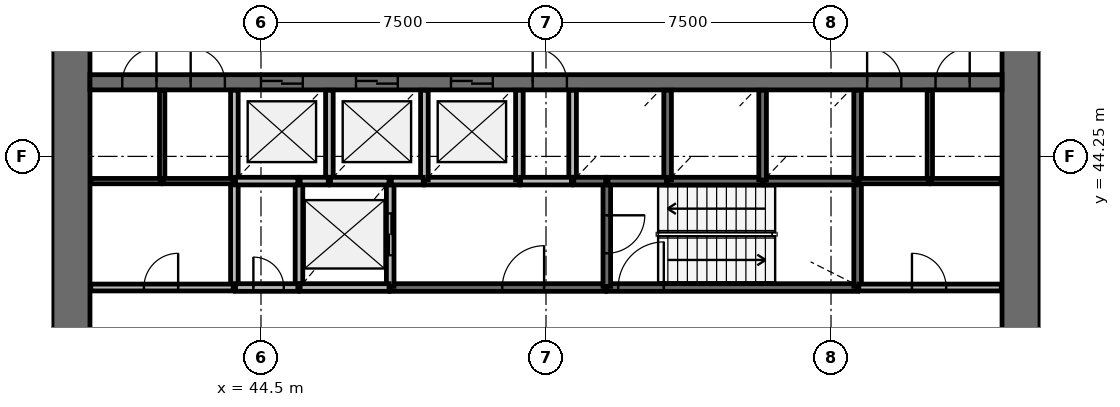
"""IFC4 building model, lengths in metres.
Left out: names, types, materials, properties, quantities, classifications, styles, units other than length and angle.
Written with IfcOpenShell. Run it as: python <this file> out.ifc"""

import sys

from ifc_helpers import new_model, si_unit, direction, frame, frame_2d, origin, place, context, subcontext, project, spatial, rectangle, extrude, source, transform, mapped, element, fill, save


model = new_model("IFC4")
c1 = context("Model", 3, precision=1e-05, world=origin(), true_north=direction((0.0, 1.0)))
c2 = subcontext(c1, "Body", "Model", "MODEL_VIEW")
j1 = project(units=[si_unit("LENGTHUNIT", "METRE"), si_unit("PLANEANGLEUNIT", "RADIAN")], contexts=[c1])
p1 = place(None, origin())
s1 = spatial("IfcSite", under=j1, at=p1, CompositionType="ELEMENT")
p2 = place(p1, origin())
s2 = spatial("IfcBuilding", under=s1, at=p2, CompositionType="ELEMENT")
p3 = place(p2, frame((0.0, 0.0, 31.4)))
s3 = spatial("IfcBuildingStorey", under=s2, at=p3, CompositionType="ELEMENT", Elevation=31.4)
p4 = place(p3, frame((64.5, 38.0, 0.0), z_axis=(0.0, 0.0, 1.0), x_axis=(0.0, 1.0, 0.0)))
e1 = element("IfcWall", 1, at=p4, inside=s3, PredefinedType="SHEAR", context=c2, shape_type="SweptSolid", body=[
    extrude(rectangle(XDim=20.0, YDim=1.0, at=frame_2d((10.0, 0.0))), origin(), (0.0, 0.0, 1.0), 4.4),
])
p5 = place(p4, frame((9.1, 0.0, 0.0)))
e2 = element("IfcOpeningElement", 2, at=p5, cuts=e1, PredefinedType="OPENING", context=c2, shape_type="SweptSolid", body=[
    extrude(rectangle(XDim=1.8, YDim=2.1, at=frame_2d((0.9, 1.05))), frame((0.0, 0.51, 0.0), z_axis=(0.0, -1.0, 0.0), x_axis=(1.0, 0.0, 0.0)), (0.0, 0.0, 1.0), 1.02),
])
p6 = place(p3, frame((39.5, 58.0, 0.0), z_axis=(0.0, 0.0, 1.0), x_axis=(0.0, -1.0, 0.0)))
e3 = element("IfcWall", 3, at=p6, inside=s3, PredefinedType="SHEAR", context=c2, shape_type="SweptSolid", body=[
    extrude(rectangle(XDim=20.0, YDim=1.0, at=frame_2d((10.0, 0.0))), origin(), (0.0, 0.0, 1.0), 4.4),
])
p7 = place(p6, frame((9.1, 0.0, 0.0)))
e4 = element("IfcOpeningElement", 4, at=p7, cuts=e3, PredefinedType="OPENING", context=c2, shape_type="SweptSolid", body=[
    extrude(rectangle(XDim=1.8, YDim=2.1, at=frame_2d((0.9, 1.05))), frame((0.0, 0.51, 0.0), z_axis=(0.0, -1.0, 0.0), x_axis=(1.0, 0.0, 0.0)), (0.0, 0.0, 1.0), 1.02),
])
p8 = place(p3, frame((40.0, 46.2, 0.0), z_axis=(0.0, 0.0, 1.0), x_axis=(1.0, 0.0, 0.0)))
e5 = element("IfcWall", 5, at=p8, inside=s3, PredefinedType="SHEAR", context=c2, shape_type="SweptSolid", body=[
    extrude(rectangle(XDim=24.0, YDim=0.4, at=frame_2d((12.0, 0.0))), origin(), (0.0, 0.0, 1.0), 4.4),
])
p9 = place(p8, frame((4.5, 0.0, 0.0)))
e6 = element("IfcOpeningElement", 6, at=p9, cuts=e5, PredefinedType="OPENING", context=c2, shape_type="SweptSolid", body=[
    extrude(rectangle(XDim=1.1, YDim=2.1, at=frame_2d((0.55, 1.05))), frame((0.0, 0.21, 0.0), z_axis=(0.0, -1.0, 0.0), x_axis=(1.0, 0.0, 0.0)), (0.0, 0.0, 1.0), 0.42),
])
p10 = place(p8, frame((7.0, 0.0, 0.0)))
e7 = element("IfcOpeningElement", 7, at=p10, cuts=e5, PredefinedType="OPENING", context=c2, shape_type="SweptSolid", body=[
    extrude(rectangle(XDim=1.1, YDim=2.1, at=frame_2d((0.55, 1.05))), frame((0.0, 0.21, 0.0), z_axis=(0.0, -1.0, 0.0), x_axis=(1.0, 0.0, 0.0)), (0.0, 0.0, 1.0), 0.42),
])
p11 = place(p8, frame((9.5, 0.0, 0.0)))
e8 = element("IfcOpeningElement", 8, at=p11, cuts=e5, PredefinedType="OPENING", context=c2, shape_type="SweptSolid", body=[
    extrude(rectangle(XDim=1.1, YDim=2.1, at=frame_2d((0.55, 1.05))), frame((0.0, 0.21, 0.0), z_axis=(0.0, -1.0, 0.0), x_axis=(1.0, 0.0, 0.0)), (0.0, 0.0, 1.0), 0.42),
])
p12 = place(p8, frame((20.45, 0.0, 0.0)))
e9 = element("IfcOpeningElement", 9, at=p12, cuts=e5, PredefinedType="OPENING", context=c2, shape_type="SweptSolid", body=[
    extrude(rectangle(XDim=0.9, YDim=2.1, at=frame_2d((0.45, 1.05))), frame((0.0, 0.21, 0.0), z_axis=(0.0, -1.0, 0.0), x_axis=(1.0, 0.0, 0.0)), (0.0, 0.0, 1.0), 0.42),
])
p13 = place(p8, frame((22.25, 0.0, 0.0)))
e10 = element("IfcOpeningElement", 10, at=p13, cuts=e5, PredefinedType="OPENING", context=c2, shape_type="SweptSolid", body=[
    extrude(rectangle(XDim=0.9, YDim=2.1, at=frame_2d((0.45, 1.05))), frame((0.0, 0.21, 0.0), z_axis=(0.0, -1.0, 0.0), x_axis=(1.0, 0.0, 0.0)), (0.0, 0.0, 1.0), 0.42),
])
p14 = place(p8, frame((0.85, 0.0, 0.0)))
e11 = element("IfcOpeningElement", 11, at=p14, cuts=e5, PredefinedType="OPENING", context=c2, shape_type="SweptSolid", body=[
    extrude(rectangle(XDim=0.9, YDim=2.1, at=frame_2d((0.45, 1.05))), frame((0.0, 0.21, 0.0), z_axis=(0.0, -1.0, 0.0), x_axis=(1.0, 0.0, 0.0)), (0.0, 0.0, 1.0), 0.42),
])
p15 = place(p8, frame((2.65, 0.0, 0.0)))
e12 = element("IfcOpeningElement", 12, at=p15, cuts=e5, PredefinedType="OPENING", context=c2, shape_type="SweptSolid", body=[
    extrude(rectangle(XDim=0.9, YDim=2.1, at=frame_2d((0.45, 1.05))), frame((0.0, 0.21, 0.0), z_axis=(0.0, -1.0, 0.0), x_axis=(1.0, 0.0, 0.0)), (0.0, 0.0, 1.0), 0.42),
])
p16 = place(p8, frame((11.65, 0.0, 0.0)))
e13 = element("IfcOpeningElement", 13, at=p16, cuts=e5, PredefinedType="OPENING", context=c2, shape_type="SweptSolid", body=[
    extrude(rectangle(XDim=0.9, YDim=2.1, at=frame_2d((0.45, 1.05))), frame((0.0, 0.21, 0.0), z_axis=(0.0, -1.0, 0.0), x_axis=(1.0, 0.0, 0.0)), (0.0, 0.0, 1.0), 0.42),
])
p17 = place(p3, frame((53.6, 40.8, 0.0), z_axis=(0.0, 0.0, 1.0), x_axis=(1.0, 0.0, 0.0)))
e14 = element("IfcWall", 14, at=p17, inside=s3, PredefinedType="SOLIDWALL", context=c2, shape_type="SweptSolid", body=[
    extrude(rectangle(XDim=6.6, YDim=0.2, at=frame_2d((3.3, 0.0))), origin(), (0.0, 0.0, 1.0), 3.95),
])
p18 = place(p17, frame((0.3, 0.0, 0.0)))
e15 = element("IfcOpeningElement", 15, at=p18, cuts=e14, PredefinedType="OPENING", context=c2, shape_type="SweptSolid", body=[
    extrude(rectangle(XDim=1.2, YDim=2.1, at=frame_2d((0.6, 1.05))), frame((0.0, 0.11, 0.0), z_axis=(0.0, -1.0, 0.0), x_axis=(1.0, 0.0, 0.0)), (0.0, 0.0, 1.0), 0.22),
])
p19 = place(p3, frame((47.9, 40.8, 0.0), z_axis=(0.0, 0.0, 1.0), x_axis=(1.0, 0.0, 0.0)))
e16 = element("IfcWall", 16, at=p19, inside=s3, PredefinedType="SOLIDWALL", context=c2, shape_type="SweptSolid", body=[
    extrude(rectangle(XDim=5.67, YDim=0.2, at=frame_2d((2.835, 0.0))), origin(), (0.0, 0.0, 1.0), 3.95),
])
p20 = place(p19, frame((2.95, 0.0, 0.0)))
e17 = element("IfcOpeningElement", 17, at=p20, cuts=e16, PredefinedType="OPENING", context=c2, shape_type="SweptSolid", body=[
    extrude(rectangle(XDim=1.1, YDim=2.1, at=frame_2d((0.55, 1.05))), frame((0.0, 0.11, 0.0), z_axis=(0.0, -1.0, 0.0), x_axis=(1.0, 0.0, 0.0)), (0.0, 0.0, 1.0), 0.22),
])
for number, where, z_axis, x_axis in (
    (18, (43.8, 43.6, 0.0), (0.0, 0.0, 1.0), (0.0, -1.0, 0.0)),
    (19, (45.5, 43.6, 0.0), (0.0, 0.0, 1.0), (0.0, -1.0, 0.0)),
):
    element("IfcWall", number, at=place(p3, frame(where, z_axis=z_axis, x_axis=x_axis)), inside=s3, PredefinedType="SOLIDWALL", context=c2, shape_type="SweptSolid", body=[
        extrude(rectangle(XDim=2.8, YDim=0.2, at=frame_2d((1.4, 0.0))), origin(), (0.0, 0.0, 1.0), 3.95),
    ])
p21 = place(p3, frame((47.9, 40.83, 0.0), z_axis=(0.0, 0.0, 1.0), x_axis=(0.0, 1.0, 0.0)))
e20 = element("IfcWall", 20, at=p21, inside=s3, PredefinedType="SOLIDWALL", context=c2, shape_type="SweptSolid", body=[
    extrude(rectangle(XDim=2.77, YDim=0.2, at=frame_2d((1.385, 0.0))), origin(), (0.0, 0.0, 1.0), 3.95),
])
p22 = place(p21, frame((0.82, 0.0, 0.0)))
e21 = element("IfcOpeningElement", 21, at=p22, cuts=e20, PredefinedType="OPENING", context=c2, shape_type="SweptSolid", body=[
    extrude(rectangle(XDim=1.1, YDim=2.1, at=frame_2d((0.55, 1.05))), frame((0.0, 0.11, 0.0), z_axis=(0.0, -1.0, 0.0), x_axis=(1.0, 0.0, 0.0)), (0.0, 0.0, 1.0), 0.22),
])
p23 = place(p3, frame((60.2, 40.83, 0.0), z_axis=(0.0, 0.0, 1.0), x_axis=(0.0, 1.0, 0.0)))
e22 = element("IfcWall", 22, at=p23, inside=s3, PredefinedType="SOLIDWALL", context=c2, shape_type="SweptSolid", body=[
    extrude(rectangle(XDim=2.77, YDim=0.2, at=frame_2d((1.385, 0.0))), origin(), (0.0, 0.0, 1.0), 3.95),
])
p24 = place(p3, frame((53.6, 43.6, 0.0), z_axis=(0.0, 0.0, 1.0), x_axis=(0.0, -1.0, 0.0)))
e23 = element("IfcWall", 23, at=p24, inside=s3, PredefinedType="SOLIDWALL", context=c2, shape_type="SweptSolid", body=[
    extrude(rectangle(XDim=2.77, YDim=0.2, at=frame_2d((1.385, 0.0))), origin(), (0.0, 0.0, 1.0), 3.95),
])
p25 = place(p24, frame((0.9, 0.0, 0.0)))
e24 = element("IfcOpeningElement", 24, at=p25, cuts=e23, PredefinedType="OPENING", context=c2, shape_type="SweptSolid", body=[
    extrude(rectangle(XDim=1.0, YDim=2.1, at=frame_2d((0.5, 1.05))), frame((0.0, 0.11, 0.0), z_axis=(0.0, -1.0, 0.0), x_axis=(1.0, 0.0, 0.0)), (0.0, 0.0, 1.0), 0.22),
])
for number, where, z_axis, x_axis in (
    (25, (48.8, 43.6, 0.0), (0.0, 0.0, 1.0), (1.0, 0.0, 0.0)),
    (26, (55.2, 43.6, 0.0), (0.0, 0.0, 1.0), (1.0, 0.0, 0.0)),
):
    element("IfcWall", number, at=place(p3, frame(where, z_axis=z_axis, x_axis=x_axis)), inside=s3, PredefinedType="SOLIDWALL", context=c2, shape_type="SweptSolid", body=[
        extrude(rectangle(XDim=2.5, YDim=0.2, at=frame_2d((1.25, 0.0))), origin(), (0.0, 0.0, 1.0), 3.95),
    ])
p26 = place(p3, frame((57.73, 43.6, 0.0), z_axis=(0.0, 0.0, 1.0), x_axis=(1.0, 0.0, 0.0)))
e27 = element("IfcWall", 27, at=p26, inside=s3, PredefinedType="SOLIDWALL", context=c2, shape_type="SweptSolid", body=[
    extrude(rectangle(XDim=2.44, YDim=0.2, at=frame_2d((1.22, 0.0))), origin(), (0.0, 0.0, 1.0), 3.95),
])
p27 = place(p3, frame((45.53, 40.8, 0.0), z_axis=(0.0, 0.0, 1.0), x_axis=(1.0, 0.0, 0.0)))
e28 = element("IfcWall", 28, at=p27, inside=s3, PredefinedType="SOLIDWALL", context=c2, shape_type="SweptSolid", body=[
    extrude(rectangle(XDim=2.34, YDim=0.2, at=frame_2d((1.17, 0.0))), origin(), (0.0, 0.0, 1.0), 3.95),
])
p28 = place(p3, frame((43.8, 45.99, 0.0), z_axis=(0.0, 0.0, 1.0), x_axis=(0.0, -1.0, 0.0)))
e29 = element("IfcWall", 29, at=p28, inside=s3, PredefinedType="SOLIDWALL", context=c2, shape_type="SweptSolid", body=[
    extrude(rectangle(XDim=2.36, YDim=0.2, at=frame_2d((1.18, 0.0))), origin(), (0.0, 0.0, 1.0), 3.95),
])
p29 = place(p3, frame((46.3, 43.6, 0.0), z_axis=(0.0, 0.0, 1.0), x_axis=(0.0, 1.0, 0.0)))
e30 = element("IfcWall", 30, at=p29, inside=s3, PredefinedType="SOLIDWALL", context=c2, shape_type="SweptSolid", body=[
    extrude(rectangle(XDim=2.39, YDim=0.2, at=frame_2d((1.195, 0.0))), origin(), (0.0, 0.0, 1.0), 3.95),
])
for number, where, z_axis, x_axis in (
    (31, (48.8, 43.63, 0.0), (0.0, 0.0, 1.0), (0.0, 1.0, 0.0)),
    (32, (51.3, 43.63, 0.0), (0.0, 0.0, 1.0), (0.0, 1.0, 0.0)),
):
    element("IfcWall", number, at=place(p3, frame(where, z_axis=z_axis, x_axis=x_axis)), inside=s3, PredefinedType="SOLIDWALL", context=c2, shape_type="SweptSolid", body=[
        extrude(rectangle(XDim=2.36, YDim=0.2, at=frame_2d((1.18, 0.0))), origin(), (0.0, 0.0, 1.0), 3.95),
    ])
p30 = place(p3, frame((52.7, 45.99, 0.0), z_axis=(0.0, 0.0, 1.0), x_axis=(0.0, -1.0, 0.0)))
e33 = element("IfcWall", 33, at=p30, inside=s3, PredefinedType="SOLIDWALL", context=c2, shape_type="SweptSolid", body=[
    extrude(rectangle(XDim=2.39, YDim=0.2, at=frame_2d((1.195, 0.0))), origin(), (0.0, 0.0, 1.0), 3.95),
])
for number, where, z_axis, x_axis in (
    (34, (55.2, 43.63, 0.0), (0.0, 0.0, 1.0), (0.0, 1.0, 0.0)),
    (35, (57.7, 43.63, 0.0), (0.0, 0.0, 1.0), (0.0, 1.0, 0.0)),
    (36, (60.2, 43.63, 0.0), (0.0, 0.0, 1.0), (0.0, 1.0, 0.0)),
):
    element("IfcWall", number, at=place(p3, frame(where, z_axis=z_axis, x_axis=x_axis)), inside=s3, PredefinedType="SOLIDWALL", context=c2, shape_type="SweptSolid", body=[
        extrude(rectangle(XDim=2.36, YDim=0.2, at=frame_2d((1.18, 0.0))), origin(), (0.0, 0.0, 1.0), 3.95),
    ])
p31 = place(p3, frame((43.83, 43.6, 0.0), z_axis=(0.0, 0.0, 1.0), x_axis=(1.0, 0.0, 0.0)))
e37 = element("IfcWall", 37, at=p31, inside=s3, PredefinedType="SOLIDWALL", context=c2, shape_type="SweptSolid", body=[
    extrude(rectangle(XDim=1.64, YDim=0.2, at=frame_2d((0.82, 0.0))), origin(), (0.0, 0.0, 1.0), 3.95),
])
p32 = place(p3, frame((43.83, 40.8, 0.0), z_axis=(0.0, 0.0, 1.0), x_axis=(1.0, 0.0, 0.0)))
e38 = element("IfcWall", 38, at=p32, inside=s3, PredefinedType="SOLIDWALL", context=c2, shape_type="SweptSolid", body=[
    extrude(rectangle(XDim=1.64, YDim=0.2, at=frame_2d((0.82, 0.0))), origin(), (0.0, 0.0, 1.0), 3.95),
])
p33 = place(p32, frame((0.47, 0.0, 0.0)))
e39 = element("IfcOpeningElement", 39, at=p33, cuts=e38, PredefinedType="OPENING", context=c2, shape_type="SweptSolid", body=[
    extrude(rectangle(XDim=0.8, YDim=2.1, at=frame_2d((0.4, 1.05))), frame((0.0, 0.11, 0.0), z_axis=(0.0, -1.0, 0.0), x_axis=(1.0, 0.0, 0.0)), (0.0, 0.0, 1.0), 0.22),
])
for number, where, z_axis, x_axis in (
    (40, (46.33, 43.6, 0.0), (0.0, 0.0, 1.0), (1.0, 0.0, 0.0)),
    (41, (53.63, 43.6, 0.0), (0.0, 0.0, 1.0), (1.0, 0.0, 0.0)),
):
    element("IfcWall", number, at=place(p3, frame(where, z_axis=z_axis, x_axis=x_axis)), inside=s3, PredefinedType="SOLIDWALL", context=c2, shape_type="SweptSolid", body=[
        extrude(rectangle(XDim=1.54, YDim=0.2, at=frame_2d((0.77, 0.0))), origin(), (0.0, 0.0, 1.0), 3.95),
    ])
p34 = place(p3, frame((52.67, 43.6, 0.0), z_axis=(0.0, 0.0, 1.0), x_axis=(-1.0, 0.0, 0.0)))
e42 = element("IfcWall", 42, at=p34, inside=s3, PredefinedType="SOLIDWALL", context=c2, shape_type="SweptSolid", body=[
    extrude(rectangle(XDim=1.34, YDim=0.2, at=frame_2d((0.67, 0.0))), origin(), (0.0, 0.0, 1.0), 3.95),
])
for number, where, z_axis, x_axis in (
    (43, (47.93, 43.6, 0.0), (0.0, 0.0, 1.0), (1.0, 0.0, 0.0)),
    (44, (52.73, 43.6, 0.0), (0.0, 0.0, 1.0), (1.0, 0.0, 0.0)),
):
    element("IfcWall", number, at=place(p3, frame(where, z_axis=z_axis, x_axis=x_axis)), inside=s3, PredefinedType="SOLIDWALL", context=c2, shape_type="SweptSolid", body=[
        extrude(rectangle(XDim=0.84, YDim=0.2, at=frame_2d((0.42, 0.0))), origin(), (0.0, 0.0, 1.0), 3.95),
    ])
p35 = place(p3, frame((45.53, 43.6, 0.0), z_axis=(0.0, 0.0, 1.0), x_axis=(1.0, 0.0, 0.0)))
e45 = element("IfcWall", 45, at=p35, inside=s3, PredefinedType="SOLIDWALL", context=c2, shape_type="SweptSolid", body=[
    extrude(rectangle(XDim=0.74, YDim=0.2, at=frame_2d((0.37, 0.0))), origin(), (0.0, 0.0, 1.0), 3.95),
])
p36 = place(p3, frame((40.02, 40.8, 0.0), z_axis=(0.0, 0.0, 1.0), x_axis=(1.0, 0.0, 0.0)))
e46 = element("IfcWall", 46, at=p36, inside=s3, PredefinedType="PARTITIONING", context=c2, shape_type="SweptSolid", body=[
    extrude(rectangle(XDim=3.75, YDim=0.18, at=frame_2d((1.875, 0.0))), origin(), (0.0, 0.0, 1.0), 3.95),
])
p37 = place(p36, frame((1.4, 0.0, 0.0)))
e47 = element("IfcOpeningElement", 47, at=p37, cuts=e46, PredefinedType="OPENING", context=c2, shape_type="SweptSolid", body=[
    extrude(rectangle(XDim=0.9, YDim=2.1, at=frame_2d((0.45, 1.05))), frame((0.0, 0.1, 0.0), z_axis=(0.0, -1.0, 0.0), x_axis=(1.0, 0.0, 0.0)), (0.0, 0.0, 1.0), 0.2),
])
p38 = place(p3, frame((60.23, 40.8, 0.0), z_axis=(0.0, 0.0, 1.0), x_axis=(1.0, 0.0, 0.0)))
e48 = element("IfcWall", 48, at=p38, inside=s3, PredefinedType="PARTITIONING", context=c2, shape_type="SweptSolid", body=[
    extrude(rectangle(XDim=3.75, YDim=0.18, at=frame_2d((1.875, 0.0))), origin(), (0.0, 0.0, 1.0), 3.95),
])
p39 = place(p38, frame((1.4, 0.0, 0.0)))
e49 = element("IfcOpeningElement", 49, at=p39, cuts=e48, PredefinedType="OPENING", context=c2, shape_type="SweptSolid", body=[
    extrude(rectangle(XDim=0.9, YDim=2.1, at=frame_2d((0.45, 1.05))), frame((0.0, 0.1, 0.0), z_axis=(0.0, -1.0, 0.0), x_axis=(1.0, 0.0, 0.0)), (0.0, 0.0, 1.0), 0.2),
])
for number, where, z_axis, x_axis in (
    (50, (41.9, 43.6, 0.0), (0.0, 0.0, 1.0), (0.0, 1.0, 0.0)),
    (51, (62.1, 43.6, 0.0), (0.0, 0.0, 1.0), (0.0, 1.0, 0.0)),
):
    element("IfcWall", number, at=place(p3, frame(where, z_axis=z_axis, x_axis=x_axis)), inside=s3, PredefinedType="PARTITIONING", context=c2, shape_type="SweptSolid", body=[
        extrude(rectangle(XDim=2.39, YDim=0.14, at=frame_2d((1.195, 0.0))), origin(), (0.0, 0.0, 1.0), 3.05),
    ])
for number, where, z_axis, x_axis in (
    (52, (43.77, 43.6, 0.0), (0.0, 0.0, 1.0), (-1.0, 0.0, 0.0)),
    (53, (60.23, 43.6, 0.0), (0.0, 0.0, 1.0), (1.0, 0.0, 0.0)),
):
    element("IfcWall", number, at=place(p3, frame(where, z_axis=z_axis, x_axis=x_axis)), inside=s3, PredefinedType="PARTITIONING", context=c2, shape_type="SweptSolid", body=[
        extrude(rectangle(XDim=1.84, YDim=0.14, at=frame_2d((0.92, 0.0))), origin(), (0.0, 0.0, 1.0), 3.05),
    ])
for number, where, z_axis, x_axis in (
    (54, (41.87, 43.6, 0.0), (0.0, 0.0, 1.0), (-1.0, 0.0, 0.0)),
    (55, (62.13, 43.6, 0.0), (0.0, 0.0, 1.0), (1.0, 0.0, 0.0)),
):
    element("IfcWall", number, at=place(p3, frame(where, z_axis=z_axis, x_axis=x_axis)), inside=s3, PredefinedType="PARTITIONING", context=c2, shape_type="SweptSolid", body=[
        extrude(rectangle(XDim=1.85, YDim=0.14, at=frame_2d((0.925, 0.0))), origin(), (0.0, 0.0, 1.0), 3.05),
    ])
m1 = source(origin(), c2, "Body", "SweptSolid", [
    extrude(rectangle(XDim=1.1, YDim=2.1, at=frame_2d((0.55, 1.05))), frame((0.0, 0.025, 0.0), z_axis=(0.0, -1.0, 0.0), x_axis=(1.0, 0.0, 0.0)), (0.0, 0.0, 1.0), 0.05),
])
p40 = place(p9, origin())
e56 = element("IfcDoor", 56, at=p40, inside=s3, OperationType="DOUBLE_DOOR_SLIDING", PredefinedType="USERDEFINED", context=c2, shape_type="MappedRepresentation", body=[
    mapped(m1, transform((0.0, 0.0, 0.0), scale=1.0)),
])
fill(e6, e56)
p41 = place(p10, origin())
e57 = element("IfcDoor", 57, at=p41, inside=s3, OperationType="DOUBLE_DOOR_SLIDING", PredefinedType="USERDEFINED", context=c2, shape_type="MappedRepresentation", body=[
    mapped(m1, transform((0.0, 0.0, 0.0), scale=1.0)),
])
fill(e7, e57)
p42 = place(p11, origin())
e58 = element("IfcDoor", 58, at=p42, inside=s3, OperationType="DOUBLE_DOOR_SLIDING", PredefinedType="USERDEFINED", context=c2, shape_type="MappedRepresentation", body=[
    mapped(m1, transform((0.0, 0.0, 0.0), scale=1.0)),
])
fill(e8, e58)
p43 = place(p22, origin())
e59 = element("IfcDoor", 59, at=p43, inside=s3, OperationType="DOUBLE_DOOR_SLIDING", PredefinedType="USERDEFINED", context=c2, shape_type="MappedRepresentation", body=[
    mapped(m1, transform((0.0, 0.0, 0.0), scale=1.0)),
])
fill(e21, e59)
m2 = source(origin(), c2, "Body", "SweptSolid", [
    extrude(rectangle(XDim=1.2, YDim=2.1, at=frame_2d((0.6, 1.05))), frame((0.0, 0.025, 0.0), z_axis=(0.0, -1.0, 0.0), x_axis=(1.0, 0.0, 0.0)), (0.0, 0.0, 1.0), 0.05),
])
p44 = place(p18, origin())
e60 = element("IfcDoor", 60, at=p44, inside=s3, OperationType="SINGLE_SWING_RIGHT", PredefinedType="DOOR", context=c2, shape_type="MappedRepresentation", body=[
    mapped(m2, transform((0.0, 0.0, 0.0), scale=1.0)),
])
fill(e15, e60)
m3 = source(origin(), c2, "Body", "SweptSolid", [
    extrude(rectangle(XDim=1.0, YDim=2.1, at=frame_2d((0.5, 1.05))), frame((0.0, 0.025, 0.0), z_axis=(0.0, -1.0, 0.0), x_axis=(1.0, 0.0, 0.0)), (0.0, 0.0, 1.0), 0.05),
])
p45 = place(p25, origin())
e61 = element("IfcDoor", 61, at=p45, inside=s3, OperationType="SINGLE_SWING_LEFT", PredefinedType="DOOR", context=c2, shape_type="MappedRepresentation", body=[
    mapped(m3, transform((0.0, 0.0, 0.0), scale=1.0)),
])
fill(e24, e61)
m4 = source(origin(), c2, "Body", "SweptSolid", [
    extrude(rectangle(XDim=1.1, YDim=2.1, at=frame_2d((0.55, 1.05))), frame((0.0, 0.025, 0.0), z_axis=(0.0, -1.0, 0.0), x_axis=(1.0, 0.0, 0.0)), (0.0, 0.0, 1.0), 0.05),
])
p46 = place(p20, origin())
e62 = element("IfcDoor", 62, at=p46, inside=s3, OperationType="SINGLE_SWING_RIGHT", PredefinedType="DOOR", context=c2, shape_type="MappedRepresentation", body=[
    mapped(m4, transform((0.0, 0.0, 0.0), scale=1.0)),
])
fill(e17, e62)
m5 = source(origin(), c2, "Body", "SweptSolid", [
    extrude(rectangle(XDim=0.8, YDim=2.1, at=frame_2d((0.4, 1.05))), frame((0.0, 0.025, 0.0), z_axis=(0.0, -1.0, 0.0), x_axis=(1.0, 0.0, 0.0)), (0.0, 0.0, 1.0), 0.05),
])
p47 = place(p33, origin())
e63 = element("IfcDoor", 63, at=p47, inside=s3, OperationType="SINGLE_SWING_LEFT", PredefinedType="DOOR", context=c2, shape_type="MappedRepresentation", body=[
    mapped(m5, transform((0.0, 0.0, 0.0), scale=1.0)),
])
fill(e39, e63)
m6 = source(origin(), c2, "Body", "SweptSolid", [
    extrude(rectangle(XDim=0.9, YDim=2.1, at=frame_2d((0.45, 1.05))), frame((0.0, 0.025, 0.0), z_axis=(0.0, -1.0, 0.0), x_axis=(1.0, 0.0, 0.0)), (0.0, 0.0, 1.0), 0.05),
])
p48 = place(p37, origin())
e64 = element("IfcDoor", 64, at=p48, inside=s3, OperationType="SINGLE_SWING_RIGHT", PredefinedType="DOOR", context=c2, shape_type="MappedRepresentation", body=[
    mapped(m6, transform((0.0, 0.0, 0.0), scale=1.0)),
])
fill(e47, e64)
p49 = place(p12, origin())
e65 = element("IfcDoor", 65, at=p49, inside=s3, OperationType="SINGLE_SWING_LEFT", PredefinedType="DOOR", context=c2, shape_type="MappedRepresentation", body=[
    mapped(m6, transform((0.0, 0.0, 0.0), scale=1.0)),
])
fill(e9, e65)
p50 = place(p13, origin())
e66 = element("IfcDoor", 66, at=p50, inside=s3, OperationType="SINGLE_SWING_RIGHT", PredefinedType="DOOR", context=c2, shape_type="MappedRepresentation", body=[
    mapped(m6, transform((0.0, 0.0, 0.0), scale=1.0)),
])
fill(e10, e66)
p51 = place(p39, origin())
e67 = element("IfcDoor", 67, at=p51, inside=s3, OperationType="SINGLE_SWING_LEFT", PredefinedType="DOOR", context=c2, shape_type="MappedRepresentation", body=[
    mapped(m6, transform((0.0, 0.0, 0.0), scale=1.0)),
])
fill(e49, e67)
p52 = place(p14, origin())
e68 = element("IfcDoor", 68, at=p52, inside=s3, OperationType="SINGLE_SWING_RIGHT", PredefinedType="DOOR", context=c2, shape_type="MappedRepresentation", body=[
    mapped(m6, transform((0.0, 0.0, 0.0), scale=1.0)),
])
fill(e11, e68)
p53 = place(p15, origin())
e69 = element("IfcDoor", 69, at=p53, inside=s3, OperationType="SINGLE_SWING_LEFT", PredefinedType="DOOR", context=c2, shape_type="MappedRepresentation", body=[
    mapped(m6, transform((0.0, 0.0, 0.0), scale=1.0)),
])
fill(e12, e69)
p54 = place(p16, origin())
e70 = element("IfcDoor", 70, at=p54, inside=s3, OperationType="SINGLE_SWING_LEFT", PredefinedType="DOOR", context=c2, shape_type="MappedRepresentation", body=[
    mapped(m6, transform((0.0, 0.0, 0.0), scale=1.0)),
])
fill(e13, e70)
save(model, sys.argv[1])
